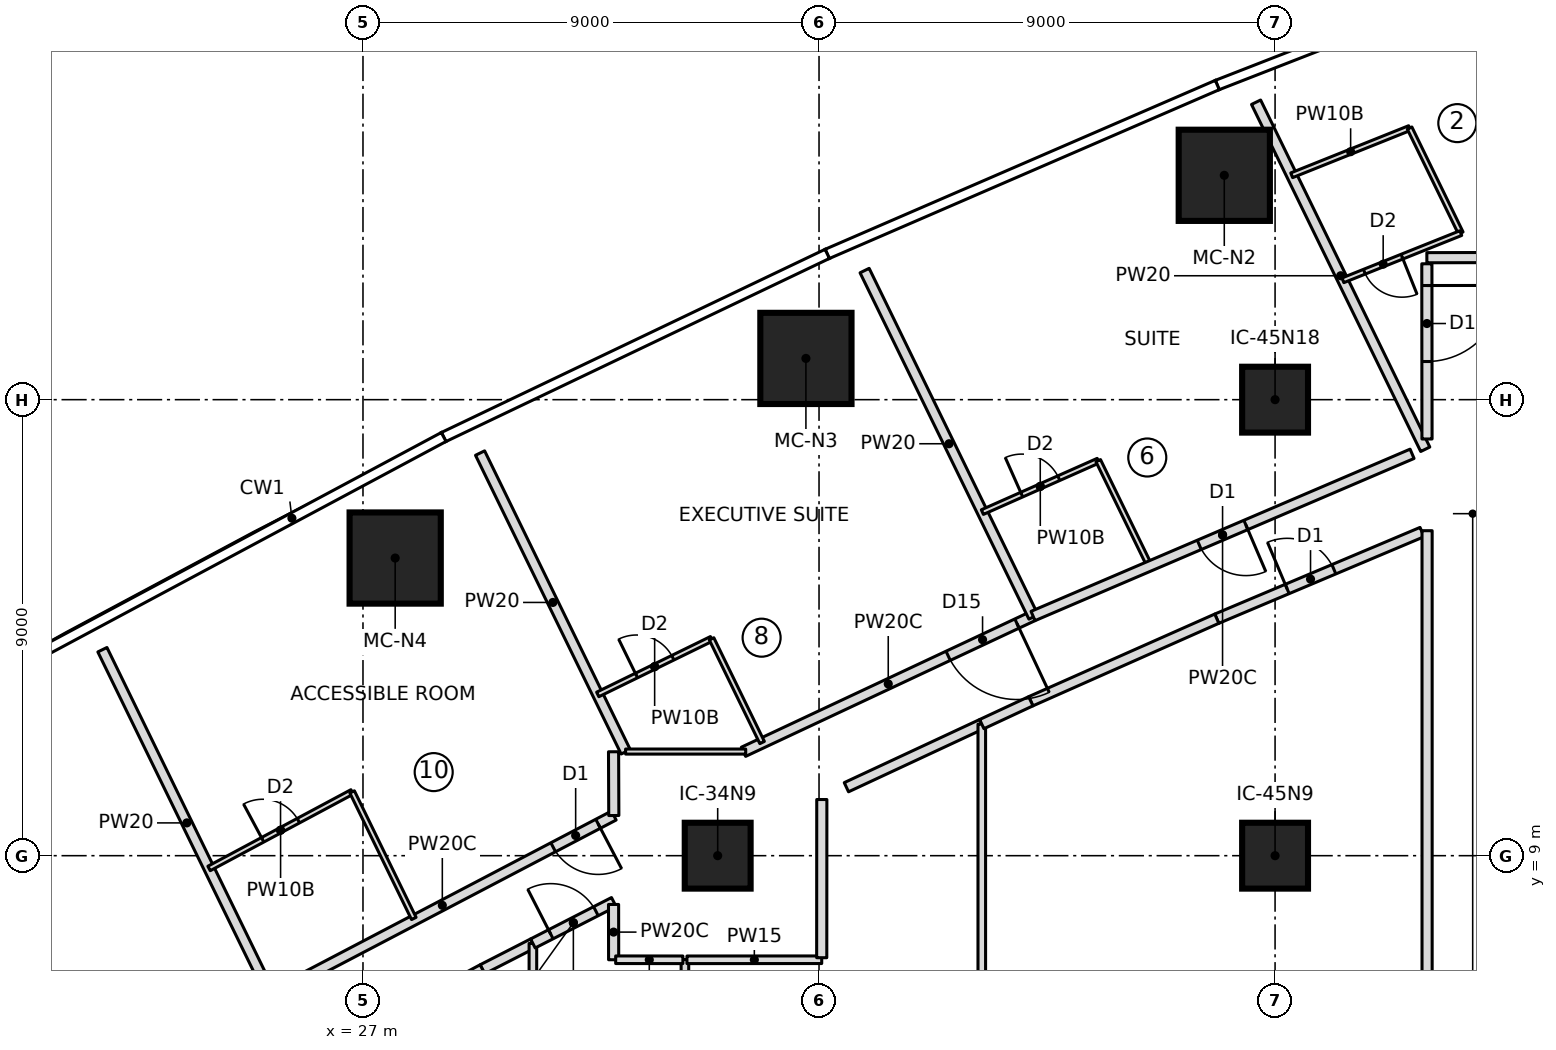
"""IFC4 building model, lengths in metres.
Left out: names, types, materials, properties, quantities, classifications, styles, units other than length and angle.
Written with IfcOpenShell. Run it as: python <this file> out.ifc"""

import sys

from ifc_helpers import new_model, si_unit, direction, frame, frame_2d, origin, origin_2d, place, context, subcontext, project, spatial, rectangle, extrude, element, fill, save


model = new_model("IFC4")
c1 = context("Model", 3, precision=1e-05, world=origin(), true_north=direction((0.0, 1.0)))
c2 = subcontext(c1, "Body", "Model", "MODEL_VIEW")
j1 = project(units=[si_unit("LENGTHUNIT", "METRE"), si_unit("PLANEANGLEUNIT", "RADIAN")], contexts=[c1])
p1 = place(None, origin())
s1 = spatial("IfcSite", under=j1, at=p1, CompositionType="ELEMENT")
p2 = place(p1, origin())
s2 = spatial("IfcBuilding", under=s1, at=p2, CompositionType="ELEMENT")
p3 = place(p2, frame((0.0, 0.0, 53.8)))
s3 = spatial("IfcBuildingStorey", under=s2, at=p3, CompositionType="ELEMENT", Elevation=53.8)
for number, where, z_axis, x_axis in (
    (1, (43.998, 22.428, 0.0), (0.0, 0.0, 1.0), (1.0, 0.0, 0.0)),
    (2, (35.741, 18.814, 0.0), (0.0, 0.0, 1.0), (1.0, 0.0, 0.0)),
    (3, (27.635, 14.874, 0.0), (0.0, 0.0, 1.0), (1.0, 0.0, 0.0)),
):
    element("IfcColumn", number, at=place(p3, frame(where, z_axis=z_axis, x_axis=x_axis)), inside=s3, PredefinedType="COLUMN", context=c2, shape_type="SweptSolid", body=[
        extrude(rectangle(XDim=1.8, YDim=1.8, at=origin_2d()), origin(), (0.0, 0.0, 1.0), 3.55),
    ])
for number, where, z_axis, x_axis in (
    (4, (34.0, 9.0, 0.0), (0.0, 0.0, 1.0), (1.0, 0.0, 0.0)),
    (5, (45.0, 9.0, 0.0), (0.0, 0.0, 1.0), (1.0, 0.0, 0.0)),
    (6, (45.0, 18.0, 0.0), (0.0, 0.0, 1.0), (1.0, 0.0, 0.0)),
):
    element("IfcColumn", number, at=place(p3, frame(where, z_axis=z_axis, x_axis=x_axis)), inside=s3, PredefinedType="COLUMN", context=c2, shape_type="SweptSolid", body=[
        extrude(rectangle(XDim=1.3, YDim=1.3, at=origin_2d()), origin(), (0.0, 0.0, 1.0), 3.55),
    ])
p4 = place(p3, frame((25.19, 6.229, 0.0), z_axis=(0.0, 0.0, 1.0), x_axis=(-0.438202895602, 0.898876088394, 0.0)))
e7 = element("IfcWall", 7, at=p4, inside=s3, PredefinedType="PARTITIONING", context=c2, shape_type="SweptSolid", body=[
    extrude(rectangle(XDim=7.605, YDim=0.2, at=frame_2d((3.803, 0.0))), origin(), (0.0, 0.0, 1.0), 3.25),
])
p5 = place(p3, frame((31.95, 9.792, 0.0), z_axis=(0.0, 0.0, 1.0), x_axis=(-0.88581965272, -0.464029678851, 0.0)))
e8 = element("IfcWall", 8, at=p5, inside=s3, PredefinedType="PARTITIONING", context=c2, shape_type="SweptSolid", body=[
    extrude(rectangle(XDim=7.641, YDim=0.2, at=frame_2d((3.821, 0.0))), origin(), (0.0, 0.0, 1.0), 3.25),
])
p6 = place(p5, frame((0.35, 0.0, 0.0)))
e9 = element("IfcOpeningElement", 9, at=p6, cuts=e8, PredefinedType="OPENING", context=c2, shape_type="SweptSolid", body=[
    extrude(rectangle(XDim=1.0, YDim=2.1, at=frame_2d((0.5, 1.05))), frame((0.0, 0.11, 0.0), z_axis=(0.0, -1.0, 0.0), x_axis=(1.0, 0.0, 0.0)), (0.0, 0.0, 1.0), 0.22),
])
p7 = place(p3, frame((23.962, 8.748, 0.0), z_axis=(0.0, 0.0, 1.0), x_axis=(0.881653338438, 0.471897648672, 0.0)))
e10 = element("IfcWall", 10, at=p7, inside=s3, PredefinedType="PARTITIONING", context=c2, shape_type="SweptSolid", body=[
    extrude(rectangle(XDim=3.202, YDim=0.1, at=frame_2d((1.601, 0.0))), origin(), (0.0, 0.0, 1.0), 3.25),
])
p8 = place(p7, frame((1.2, 0.0, 0.0)))
e11 = element("IfcOpeningElement", 11, at=p8, cuts=e10, PredefinedType="OPENING", context=c2, shape_type="SweptSolid", body=[
    extrude(rectangle(XDim=0.8, YDim=2.1, at=frame_2d((0.4, 1.05))), frame((0.0, 0.06, 0.0), z_axis=(0.0, -1.0, 0.0), x_axis=(1.0, 0.0, 0.0)), (0.0, 0.0, 1.0), 0.12),
])
p9 = place(p3, frame((26.786, 10.259, 0.0), z_axis=(0.0, 0.0, 1.0), x_axis=(0.43822975423, -0.898862994292, 0.0)))
e12 = element("IfcWall", 12, at=p9, inside=s3, PredefinedType="PARTITIONING", context=c2, shape_type="SweptSolid", body=[
    extrude(rectangle(XDim=2.779, YDim=0.1, at=frame_2d((1.389, 0.0))), origin(), (0.0, 0.0, 1.0), 3.25),
])
p10 = place(p3, frame((32.185, 11.05, 0.0), z_axis=(0.0, 0.0, 1.0), x_axis=(-0.438228560869, 0.898863576099, 0.0)))
e13 = element("IfcWall", 13, at=p10, inside=s3, PredefinedType="PARTITIONING", context=c2, shape_type="SweptSolid", body=[
    extrude(rectangle(XDim=6.559, YDim=0.2, at=frame_2d((3.28, 0.0))), origin(), (0.0, 0.0, 1.0), 3.25),
])
p11 = place(p3, frame((40.223, 13.73, 0.0), z_axis=(0.0, 0.0, 1.0), x_axis=(-0.905363217407, -0.424638015923, 0.0)))
e14 = element("IfcWall", 14, at=p11, inside=s3, PredefinedType="PARTITIONING", context=c2, shape_type="SweptSolid", body=[
    extrude(rectangle(XDim=6.312, YDim=0.2, at=frame_2d((3.156, 0.0))), origin(), (0.0, 0.0, 1.0), 3.25),
])
p12 = place(p11, frame((0.35, 0.0, 0.0)))
e15 = element("IfcOpeningElement", 15, at=p12, cuts=e14, PredefinedType="OPENING", context=c2, shape_type="SweptSolid", body=[
    extrude(rectangle(XDim=1.5, YDim=2.1, at=frame_2d((0.75, 1.05))), frame((0.0, 0.11, 0.0), z_axis=(0.0, -1.0, 0.0), x_axis=(1.0, 0.0, 0.0)), (0.0, 0.0, 1.0), 0.22),
])
p13 = place(p3, frame((31.633, 12.182, 0.0), z_axis=(0.0, 0.0, 1.0), x_axis=(0.89845285455, 0.439070003702, 0.0)))
e16 = element("IfcWall", 16, at=p13, inside=s3, PredefinedType="PARTITIONING", context=c2, shape_type="SweptSolid", body=[
    extrude(rectangle(XDim=2.5, YDim=0.1, at=frame_2d((1.25, 0.0))), origin(), (0.0, 0.0, 1.0), 3.25),
])
p14 = place(p13, frame((0.85, 0.0, 0.0)))
e17 = element("IfcOpeningElement", 17, at=p14, cuts=e16, PredefinedType="OPENING", context=c2, shape_type="SweptSolid", body=[
    extrude(rectangle(XDim=0.8, YDim=2.1, at=frame_2d((0.4, 1.05))), frame((0.0, 0.06, 0.0), z_axis=(0.0, -1.0, 0.0), x_axis=(1.0, 0.0, 0.0)), (0.0, 0.0, 1.0), 0.12),
])
p15 = place(p3, frame((33.879, 13.28, 0.0), z_axis=(0.0, 0.0, 1.0), x_axis=(0.438227154656, -0.898864261678, 0.0)))
e18 = element("IfcWall", 18, at=p15, inside=s3, PredefinedType="PARTITIONING", context=c2, shape_type="SweptSolid", body=[
    extrude(rectangle(XDim=2.277, YDim=0.1, at=frame_2d((1.138, 0.0))), origin(), (0.0, 0.0, 1.0), 3.25),
])
p16 = place(p3, frame((40.232, 13.712, 0.0), z_axis=(0.0, 0.0, 1.0), x_axis=(-0.438202247191, 0.898876404494, 0.0)))
e19 = element("IfcWall", 19, at=p16, inside=s3, PredefinedType="PARTITIONING", context=c2, shape_type="SweptSolid", body=[
    extrude(rectangle(XDim=7.605, YDim=0.2, at=frame_2d((3.802, 0.0))), origin(), (0.0, 0.0, 1.0), 3.25),
])
p17 = place(p3, frame((39.223, 15.781, 0.0), z_axis=(0.0, 0.0, 1.0), x_axis=(0.914000607553, 0.405712816401, 0.0)))
e20 = element("IfcWall", 20, at=p17, inside=s3, PredefinedType="PARTITIONING", context=c2, shape_type="SweptSolid", body=[
    extrude(rectangle(XDim=2.501, YDim=0.1, at=frame_2d((1.251, 0.0))), origin(), (0.0, 0.0, 1.0), 3.25),
])
p18 = place(p17, frame((0.85, 0.0, 0.0)))
e21 = element("IfcOpeningElement", 21, at=p18, cuts=e20, PredefinedType="OPENING", context=c2, shape_type="SweptSolid", body=[
    extrude(rectangle(XDim=0.8, YDim=2.1, at=frame_2d((0.4, 1.05))), frame((0.0, 0.06, 0.0), z_axis=(0.0, -1.0, 0.0), x_axis=(1.0, 0.0, 0.0)), (0.0, 0.0, 1.0), 0.12),
])
p19 = place(p3, frame((41.51, 16.796, 0.0), z_axis=(0.0, 0.0, 1.0), x_axis=(0.4381470535, -0.898903309321, 0.0)))
e22 = element("IfcWall", 22, at=p19, inside=s3, PredefinedType="PARTITIONING", context=c2, shape_type="SweptSolid", body=[
    extrude(rectangle(XDim=2.278, YDim=0.1, at=frame_2d((1.139, 0.0))), origin(), (0.0, 0.0, 1.0), 3.25),
])
p20 = place(p3, frame((47.964, 17.021, 0.0), z_axis=(0.0, 0.0, 1.0), x_axis=(-0.438207101073, 0.898874038211, 0.0)))
e23 = element("IfcWall", 23, at=p20, inside=s3, PredefinedType="PARTITIONING", context=c2, shape_type="SweptSolid", body=[
    extrude(rectangle(XDim=7.62, YDim=0.2, at=frame_2d((3.81, 0.0))), origin(), (0.0, 0.0, 1.0), 3.25),
])
p21 = place(p3, frame((45.328, 22.428, 0.0), z_axis=(0.0, 0.0, 1.0), x_axis=(0.928288495333, 0.371860819975, 0.0)))
e24 = element("IfcWall", 24, at=p21, inside=s3, PredefinedType="PARTITIONING", context=c2, shape_type="SweptSolid", body=[
    extrude(rectangle(XDim=2.507, YDim=0.1, at=frame_2d((1.253, 0.0))), origin(), (0.0, 0.0, 1.0), 3.25),
])
p22 = place(p3, frame((47.655, 23.361, 0.0), z_axis=(0.0, 0.0, 1.0), x_axis=(0.438171240168, -0.898891519756, 0.0)))
e25 = element("IfcWall", 25, at=p22, inside=s3, PredefinedType="PARTITIONING", context=c2, shape_type="SweptSolid", body=[
    extrude(rectangle(XDim=2.306, YDim=0.1, at=frame_2d((1.153, 0.0))), origin(), (0.0, 0.0, 1.0), 3.25),
])
p23 = place(p3, frame((48.665, 21.288, 0.0), z_axis=(0.0, 0.0, 1.0), x_axis=(-0.928288495333, -0.371860819975, 0.0)))
e26 = element("IfcWall", 26, at=p23, inside=s3, PredefinedType="PARTITIONING", context=c2, shape_type="SweptSolid", body=[
    extrude(rectangle(XDim=2.507, YDim=0.1, at=frame_2d((1.253, 0.0))), origin(), (0.0, 0.0, 1.0), 3.25),
])
p24 = place(p23, frame((1.25, 0.0, 0.0)))
e27 = element("IfcOpeningElement", 27, at=p24, cuts=e26, PredefinedType="OPENING", context=c2, shape_type="SweptSolid", body=[
    extrude(rectangle(XDim=0.8, YDim=2.1, at=frame_2d((0.4, 1.05))), frame((0.0, 0.06, 0.0), z_axis=(0.0, -1.0, 0.0), x_axis=(1.0, 0.0, 0.0)), (0.0, 0.0, 1.0), 0.12),
])
p25 = place(p3, frame((29.357, 6.758, 0.0), z_axis=(0.0, 0.0, 1.0), x_axis=(0.890241988655, 0.455487872106, 0.0)))
e28 = element("IfcWall", 28, at=p25, inside=s3, PredefinedType="PARTITIONING", context=c2, shape_type="SweptSolid", body=[
    extrude(rectangle(XDim=1.119, YDim=0.2, at=frame_2d((0.559, 0.0))), origin(), (0.0, 0.0, 1.0), 3.25),
])
p26 = place(p3, frame((25.817, 4.863, 0.0), z_axis=(0.0, 0.0, 1.0), x_axis=(0.881655245922, 0.471894084874, 0.0)))
e29 = element("IfcWall", 29, at=p26, inside=s3, PredefinedType="PARTITIONING", context=c2, shape_type="SweptSolid", body=[
    extrude(rectangle(XDim=4.016, YDim=0.2, at=frame_2d((2.008, 0.0))), origin(), (0.0, 0.0, 1.0), 3.25),
])
p27 = place(p3, frame((30.353, -7.268, 0.0), z_axis=(0.0, 0.0, 1.0), x_axis=(0.0, 1.0, 0.0)))
e30 = element("IfcWall", 30, at=p27, inside=s3, PredefinedType="PARTITIONING", context=c2, shape_type="SweptSolid", body=[
    extrude(rectangle(XDim=14.535, YDim=0.15, at=frame_2d((7.268, 0.0))), origin(), (0.0, 0.0, 1.0), 3.25),
])
p28 = place(p3, frame((30.353, 7.268, 0.0), z_axis=(0.0, 0.0, 1.0), x_axis=(0.890195531144, 0.455578660969, 0.0)))
e31 = element("IfcWall", 31, at=p28, inside=s3, PredefinedType="PARTITIONING", context=c2, shape_type="SweptSolid", body=[
    extrude(rectangle(XDim=1.794, YDim=0.2, at=frame_2d((0.897, 0.0))), origin(), (0.0, 0.0, 1.0), 3.25),
])
p29 = place(p28, frame((0.397, 0.0, 0.0)))
e32 = element("IfcOpeningElement", 32, at=p29, cuts=e31, PredefinedType="OPENING", context=c2, shape_type="SweptSolid", body=[
    extrude(rectangle(XDim=1.0, YDim=2.1, at=frame_2d((0.5, 1.05))), frame((0.0, 0.11, 0.0), z_axis=(0.0, -1.0, 0.0), x_axis=(1.0, 0.0, 0.0)), (0.0, 0.0, 1.0), 0.22),
])
p30 = place(p3, frame((33.353, -6.95, 0.0), z_axis=(0.0, 0.0, 1.0), x_axis=(0.0, 1.0, 0.0)))
e33 = element("IfcWall", 33, at=p30, inside=s3, PredefinedType="PARTITIONING", context=c2, shape_type="SweptSolid", body=[
    extrude(rectangle(XDim=13.9, YDim=0.15, at=frame_2d((6.95, 0.0))), origin(), (0.0, 0.0, 1.0), 3.25),
])
p31 = place(p3, frame((36.54, 10.351, 0.0), z_axis=(0.0, 0.0, 1.0), x_axis=(0.906348100281, 0.422531798943, 0.0)))
e34 = element("IfcWall", 34, at=p31, inside=s3, PredefinedType="PARTITIONING", context=c2, shape_type="SweptSolid", body=[
    extrude(rectangle(XDim=2.948, YDim=0.2, at=frame_2d((1.474, 0.0))), origin(), (0.0, 0.0, 1.0), 3.25),
])
p32 = place(p3, frame((39.212, -11.597, 0.0), z_axis=(0.0, 0.0, 1.0), x_axis=(0.0, 1.0, 0.0)))
e35 = element("IfcWall", 35, at=p32, inside=s3, PredefinedType="PARTITIONING", context=c2, shape_type="SweptSolid", body=[
    extrude(rectangle(XDim=23.193, YDim=0.15, at=frame_2d((11.597, 0.0))), origin(), (0.0, 0.0, 1.0), 3.25),
])
p33 = place(p3, frame((43.85, 13.677, 0.0), z_axis=(0.0, 0.0, 1.0), x_axis=(0.921265924084, 0.388933281068, 0.0)))
e36 = element("IfcWall", 36, at=p33, inside=s3, PredefinedType="PARTITIONING", context=c2, shape_type="SweptSolid", body=[
    extrude(rectangle(XDim=4.396, YDim=0.2, at=frame_2d((2.198, 0.0))), origin(), (0.0, 0.0, 1.0), 3.25),
])
p34 = place(p33, frame((1.508, 0.0, 0.0)))
e37 = element("IfcOpeningElement", 37, at=p34, cuts=e36, PredefinedType="OPENING", context=c2, shape_type="SweptSolid", body=[
    extrude(rectangle(XDim=1.0, YDim=2.1, at=frame_2d((0.5, 1.05))), frame((0.0, 0.11, 0.0), z_axis=(0.0, -1.0, 0.0), x_axis=(1.0, 0.0, 0.0)), (0.0, 0.0, 1.0), 0.22),
])
p35 = place(p3, frame((40.18, 12.048, 0.0), z_axis=(0.0, 0.0, 1.0), x_axis=(0.913986953061, 0.405743576209, 0.0)))
e38 = element("IfcWall", 38, at=p35, inside=s3, PredefinedType="PARTITIONING", context=c2, shape_type="SweptSolid", body=[
    extrude(rectangle(XDim=4.016, YDim=0.2, at=frame_2d((2.008, 0.0))), origin(), (0.0, 0.0, 1.0), 3.25),
])
p36 = place(p3, frame((39.212, 11.597, 0.0), z_axis=(0.0, 0.0, 1.0), x_axis=(0.906346628109, 0.422534956797, 0.0)))
e39 = element("IfcWall", 39, at=p36, inside=s3, PredefinedType="PARTITIONING", context=c2, shape_type="SweptSolid", body=[
    extrude(rectangle(XDim=1.068, YDim=0.2, at=frame_2d((0.534, 0.0))), origin(), (0.0, 0.0, 1.0), 3.25),
])
p37 = place(p3, frame((34.553, 11.055, 0.0), z_axis=(0.0, 0.0, 1.0), x_axis=(-1.0, 0.0, 0.0)))
e40 = element("IfcWall", 40, at=p37, inside=s3, PredefinedType="PARTITIONING", context=c2, shape_type="SweptSolid", body=[
    extrude(rectangle(XDim=2.371, YDim=0.1, at=frame_2d((1.186, 0.0))), origin(), (0.0, 0.0, 1.0), 3.25),
])
p38 = place(p3, frame((47.704, 16.931, 0.0), z_axis=(0.0, 0.0, 1.0), x_axis=(-0.919360612497, -0.39341589214, 0.0)))
e41 = element("IfcWall", 41, at=p38, inside=s3, PredefinedType="PARTITIONING", context=c2, shape_type="SweptSolid", body=[
    extrude(rectangle(XDim=8.137, YDim=0.2, at=frame_2d((4.068, 0.0))), origin(), (0.0, 0.0, 1.0), 3.25),
])
p39 = place(p38, frame((3.568, 0.0, 0.0)))
e42 = element("IfcOpeningElement", 42, at=p39, cuts=e41, PredefinedType="OPENING", context=c2, shape_type="SweptSolid", body=[
    extrude(rectangle(XDim=1.0, YDim=2.1, at=frame_2d((0.5, 1.05))), frame((0.0, 0.11, 0.0), z_axis=(0.0, -1.0, 0.0), x_axis=(1.0, 0.0, 0.0)), (0.0, 0.0, 1.0), 0.22),
])
p40 = place(p3, frame((31.945, 8.037, 0.0), z_axis=(0.0, 0.0, 1.0), x_axis=(0.001565993606, -0.999998773831, 0.0)))
e43 = element("IfcWall", 43, at=p40, inside=s3, PredefinedType="PARTITIONING", context=c2, shape_type="SweptSolid", body=[
    extrude(rectangle(XDim=1.091, YDim=0.2, at=frame_2d((0.546, 0.0))), origin(), (0.0, 0.0, 1.0), 3.25),
])
p41 = place(p3, frame((31.987, 6.946, 0.0), z_axis=(0.0, 0.0, 1.0), x_axis=(0.999999728974, -0.000736241288, 0.0)))
e44 = element("IfcWall", 44, at=p41, inside=s3, PredefinedType="PARTITIONING", context=c2, shape_type="SweptSolid", body=[
    extrude(rectangle(XDim=1.326, YDim=0.15, at=frame_2d((0.663, 0.0))), origin(), (0.0, 0.0, 1.0), 3.25),
])
p42 = place(p3, frame((33.393, 6.945, 0.0), z_axis=(0.0, 0.0, 1.0), x_axis=(0.999999932604, 0.000367140866, 0.0)))
e45 = element("IfcWall", 45, at=p42, inside=s3, PredefinedType="PARTITIONING", context=c2, shape_type="SweptSolid", body=[
    extrude(rectangle(XDim=2.66, YDim=0.15, at=frame_2d((1.33, 0.0))), origin(), (0.0, 0.0, 1.0), 3.25),
])
p43 = place(p3, frame((36.053, 6.986, 0.0), z_axis=(0.0, 0.0, 1.0), x_axis=(0.000547345293, 0.999999850207, 0.0)))
e46 = element("IfcWall", 46, at=p43, inside=s3, PredefinedType="PARTITIONING", context=c2, shape_type="SweptSolid", body=[
    extrude(rectangle(XDim=3.122, YDim=0.2, at=frame_2d((1.561, 0.0))), origin(), (0.0, 0.0, 1.0), 3.25),
])
p44 = place(p3, frame((48.0, 15.414, 0.0), z_axis=(0.0, 0.0, 1.0), x_axis=(0.0, -1.0, 0.0)))
e47 = element("IfcWall", 47, at=p44, inside=s3, PredefinedType="PARTITIONING", context=c2, shape_type="SweptSolid", body=[
    extrude(rectangle(XDim=30.828, YDim=0.2, at=frame_2d((15.414, 0.0))), origin(), (0.0, 0.0, 1.0), 3.25),
])
p45 = place(p3, frame((31.945, 11.051, 0.0), z_axis=(0.0, 0.0, 1.0), x_axis=(0.00387969922, -0.999992473939, 0.0)))
e48 = element("IfcWall", 48, at=p45, inside=s3, PredefinedType="PARTITIONING", context=c2, shape_type="SweptSolid", body=[
    extrude(rectangle(XDim=1.259, YDim=0.2, at=frame_2d((0.629, 0.0))), origin(), (0.0, 0.0, 1.0), 3.25),
])
p46 = place(p3, frame((49.5, 20.805, 0.0), z_axis=(0.0, 0.0, 1.0), x_axis=(-0.999998104399, -0.001947099992, 0.0)))
e49 = element("IfcWall", 49, at=p46, inside=s3, PredefinedType="PARTITIONING", context=c2, shape_type="SweptSolid", body=[
    extrude(rectangle(XDim=1.505, YDim=0.2, at=frame_2d((0.752, 0.0))), origin(), (0.0, 0.0, 1.0), 3.25),
])
p47 = place(p3, frame((47.996, 20.682, 0.0), z_axis=(0.0, 0.0, 1.0), x_axis=(0.000847217996, -0.999999641111, 0.0)))
e50 = element("IfcWall", 50, at=p47, inside=s3, PredefinedType="PARTITIONING", context=c2, shape_type="SweptSolid", body=[
    extrude(rectangle(XDim=3.458, YDim=0.2, at=frame_2d((1.729, 0.0))), origin(), (0.0, 0.0, 1.0), 3.25),
])
p48 = place(p47, frame((0.429, 0.0, 0.0)))
e51 = element("IfcOpeningElement", 51, at=p48, cuts=e50, PredefinedType="OPENING", context=c2, shape_type="SweptSolid", body=[
    extrude(rectangle(XDim=1.5, YDim=2.1, at=frame_2d((0.75, 1.05))), frame((0.0, 0.11, 0.0), z_axis=(0.0, -1.0, 0.0), x_axis=(1.0, 0.0, 0.0)), (0.0, 0.0, 1.0), 0.22),
])
p49 = place(p8, origin())
e52 = element("IfcDoor", 52, at=p49, inside=s3, OperationType="SINGLE_SWING_LEFT", PredefinedType="DOOR", context=c2, shape_type="SweptSolid", body=[
    extrude(rectangle(XDim=0.8, YDim=2.1, at=frame_2d((0.4, 1.05))), frame((0.0, 0.025, 0.0), z_axis=(0.0, -1.0, 0.0), x_axis=(1.0, 0.0, 0.0)), (0.0, 0.0, 1.0), 0.05),
])
fill(e11, e52)
p50 = place(p6, origin())
e53 = element("IfcDoor", 53, at=p50, inside=s3, OperationType="SINGLE_SWING_LEFT", PredefinedType="DOOR", context=c2, shape_type="SweptSolid", body=[
    extrude(rectangle(XDim=1.0, YDim=2.1, at=frame_2d((0.5, 1.05))), frame((0.0, 0.025, 0.0), z_axis=(0.0, -1.0, 0.0), x_axis=(1.0, 0.0, 0.0)), (0.0, 0.0, 1.0), 0.05),
])
fill(e9, e53)
p51 = place(p14, origin())
e54 = element("IfcDoor", 54, at=p51, inside=s3, OperationType="SINGLE_SWING_LEFT", PredefinedType="DOOR", context=c2, shape_type="SweptSolid", body=[
    extrude(rectangle(XDim=0.8, YDim=2.1, at=frame_2d((0.4, 1.05))), frame((0.0, 0.025, 0.0), z_axis=(0.0, -1.0, 0.0), x_axis=(1.0, 0.0, 0.0)), (0.0, 0.0, 1.0), 0.05),
])
fill(e17, e54)
p52 = place(p12, origin())
e55 = element("IfcDoor", 55, at=p52, inside=s3, OperationType="DOUBLE_DOOR_SINGLE_SWING", PredefinedType="DOOR", context=c2, shape_type="SweptSolid", body=[
    extrude(rectangle(XDim=1.5, YDim=2.1, at=frame_2d((0.75, 1.05))), frame((0.0, 0.025, 0.0), z_axis=(0.0, -1.0, 0.0), x_axis=(1.0, 0.0, 0.0)), (0.0, 0.0, 1.0), 0.05),
])
fill(e15, e55)
p53 = place(p18, origin())
e56 = element("IfcDoor", 56, at=p53, inside=s3, OperationType="SINGLE_SWING_LEFT", PredefinedType="DOOR", context=c2, shape_type="SweptSolid", body=[
    extrude(rectangle(XDim=0.8, YDim=2.1, at=frame_2d((0.4, 1.05))), frame((0.0, 0.025, 0.0), z_axis=(0.0, -1.0, 0.0), x_axis=(1.0, 0.0, 0.0)), (0.0, 0.0, 1.0), 0.05),
])
fill(e21, e56)
p54 = place(p39, origin())
e57 = element("IfcDoor", 57, at=p54, inside=s3, OperationType="SINGLE_SWING_LEFT", PredefinedType="DOOR", context=c2, shape_type="SweptSolid", body=[
    extrude(rectangle(XDim=1.0, YDim=2.1, at=frame_2d((0.5, 1.05))), frame((0.0, 0.025, 0.0), z_axis=(0.0, -1.0, 0.0), x_axis=(1.0, 0.0, 0.0)), (0.0, 0.0, 1.0), 0.05),
])
fill(e42, e57)
p55 = place(p24, origin())
e58 = element("IfcDoor", 58, at=p55, inside=s3, OperationType="SINGLE_SWING_LEFT", PredefinedType="DOOR", context=c2, shape_type="SweptSolid", body=[
    extrude(rectangle(XDim=0.8, YDim=2.1, at=frame_2d((0.4, 1.05))), frame((0.0, 0.025, 0.0), z_axis=(0.0, -1.0, 0.0), x_axis=(1.0, 0.0, 0.0)), (0.0, 0.0, 1.0), 0.05),
])
fill(e27, e58)
p56 = place(p29, origin())
e59 = element("IfcDoor", 59, at=p56, inside=s3, OperationType="SINGLE_SWING_LEFT", PredefinedType="DOOR", context=c2, shape_type="SweptSolid", body=[
    extrude(rectangle(XDim=1.0, YDim=2.1, at=frame_2d((0.5, 1.05))), frame((0.0, 0.025, 0.0), z_axis=(0.0, -1.0, 0.0), x_axis=(1.0, 0.0, 0.0)), (0.0, 0.0, 1.0), 0.05),
])
fill(e32, e59)
p57 = place(p34, origin())
e60 = element("IfcDoor", 60, at=p57, inside=s3, OperationType="SINGLE_SWING_LEFT", PredefinedType="DOOR", context=c2, shape_type="SweptSolid", body=[
    extrude(rectangle(XDim=1.0, YDim=2.1, at=frame_2d((0.5, 1.05))), frame((0.0, 0.025, 0.0), z_axis=(0.0, -1.0, 0.0), x_axis=(1.0, 0.0, 0.0)), (0.0, 0.0, 1.0), 0.05),
])
fill(e37, e60)
p58 = place(p48, origin())
e61 = element("IfcDoor", 61, at=p58, inside=s3, OperationType="DOUBLE_DOOR_SINGLE_SWING", PredefinedType="DOOR", context=c2, shape_type="SweptSolid", body=[
    extrude(rectangle(XDim=1.5, YDim=2.1, at=frame_2d((0.75, 1.05))), frame((0.0, 0.025, 0.0), z_axis=(0.0, -1.0, 0.0), x_axis=(1.0, 0.0, 0.0)), (0.0, 0.0, 1.0), 0.05),
])
fill(e51, e61)
save(model, sys.argv[1])
